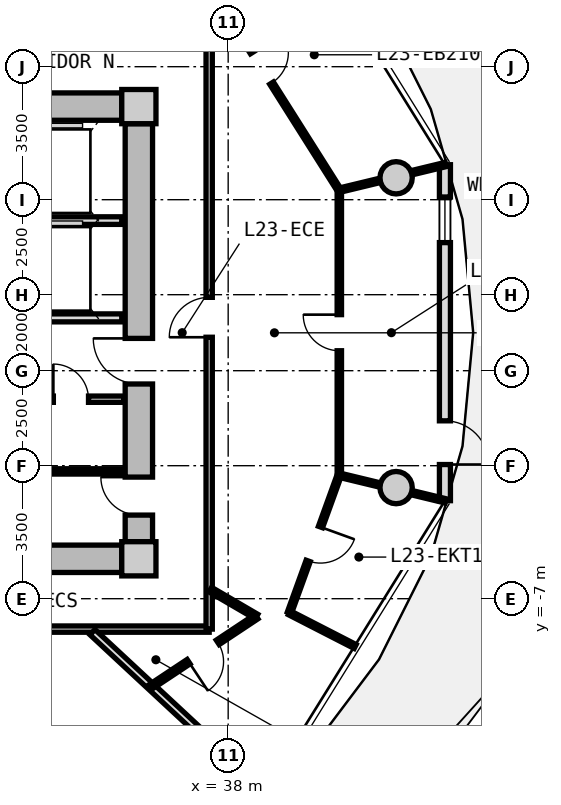
"""IFC4 building model, lengths in metres.
Left out: names, types, materials, properties, quantities, classifications, styles, units other than length and angle.
Written with IfcOpenShell. Run it as: python <this file> out.ifc"""

import sys

from ifc_helpers import new_model, si_unit, direction, frame, frame_2d, origin, origin_2d, place, context, subcontext, project, spatial, rectangle, circle, extrude, source, transform, mapped, element, fill, save


model = new_model("IFC4")
c1 = context("Model", 3, precision=1e-05, world=origin(), true_north=direction((0.0, 1.0)))
c2 = subcontext(c1, "Body", "Model", "MODEL_VIEW")
j1 = project(units=[si_unit("LENGTHUNIT", "METRE"), si_unit("PLANEANGLEUNIT", "RADIAN")], contexts=[c1])
p1 = place(None, origin())
s1 = spatial("IfcSite", under=j1, at=p1, CompositionType="ELEMENT")
p2 = place(p1, origin())
s2 = spatial("IfcBuilding", under=s1, at=p2, CompositionType="ELEMENT")
p3 = place(p2, frame((0.0, 0.0, 77.95)))
s3 = spatial("IfcBuildingStorey", under=s2, at=p3, CompositionType="ELEMENT", Elevation=77.95)
m1 = source(origin(), c2, "Body", "SweptSolid", [
    extrude(rectangle(XDim=0.9, YDim=0.9, at=origin_2d()), origin(), (0.0, 0.0, 1.0), 3.05),
])
for number, where, z_axis, x_axis in (
    (1, (35.65, -5.95, 0.0), (0.0, 0.0, 1.0), (1.0, 0.0, 0.0)),
    (2, (35.65, 5.95, 0.0), (0.0, 0.0, 1.0), (1.0, 0.0, 0.0)),
):
    element("IfcColumn", number, at=place(p3, frame(where, z_axis=z_axis, x_axis=x_axis)), inside=s3, PredefinedType="COLUMN", context=c2, shape_type="MappedRepresentation", body=[
        mapped(m1, transform((0.0, 0.0, 0.0), x_axis=(1.0, 0.0, 0.0), y_axis=(0.0, 1.0, 0.0), z_axis=(0.0, 0.0, 1.0), scale=1.0)),
    ])
m2 = source(origin(), c2, "Body", "SweptSolid", [
    extrude(rectangle(XDim=14.4, YDim=0.72, at=frame_2d((7.2, 0.0))), origin(), (0.0, 0.0, 1.0), 2.79),
])
for number, where, z_axis, x_axis in (
    (3, (20.8, 5.95, 0.0), (0.0, 0.0, 1.0), (1.0, 0.0, 0.0)),
    (4, (35.2, -5.95, 0.0), (0.0, 0.0, 1.0), (-1.0, 0.0, 0.0)),
):
    element("IfcWall", number, at=place(p3, frame(where, z_axis=z_axis, x_axis=x_axis)), inside=s3, PredefinedType="SHEAR", context=c2, shape_type="MappedRepresentation", body=[
        mapped(m2, transform((0.0, 0.0, 0.0), x_axis=(1.0, 0.0, 0.0), y_axis=(0.0, 1.0, 0.0), z_axis=(0.0, 0.0, 1.0), scale=1.0)),
    ])
m3 = source(origin(), c2, "Body", "SweptSolid", [
    extrude(rectangle(XDim=11.0, YDim=0.72, at=frame_2d((5.5, 0.0))), origin(), (0.0, 0.0, 1.0), 2.79),
])
p4 = place(p3, frame((35.65, 5.5, 0.0), z_axis=(0.0, 0.0, 1.0), x_axis=(0.0, -1.0, 0.0)))
e5 = element("IfcWall", 5, at=p4, inside=s3, PredefinedType="SHEAR", context=c2, shape_type="MappedRepresentation", body=[
    mapped(m3, transform((0.0, 0.0, 0.0), x_axis=(1.0, 0.0, 0.0), y_axis=(0.0, 1.0, 0.0), z_axis=(0.0, 0.0, 1.0), scale=1.0)),
])
p5 = place(p4, frame((5.65, 0.0, 0.0)))
e6 = element("IfcOpeningElement", 6, at=p5, cuts=e5, PredefinedType="OPENING", context=c2, shape_type="SweptSolid", body=[
    extrude(rectangle(XDim=1.2, YDim=2.15, at=frame_2d((0.6, 1.075))), frame((0.0, 0.37, 0.0), z_axis=(0.0, -1.0, 0.0), x_axis=(1.0, 0.0, 0.0)), (0.0, 0.0, 1.0), 0.74),
])
p6 = place(p4, frame((9.3, 0.0, 0.0)))
e7 = element("IfcOpeningElement", 7, at=p6, cuts=e5, PredefinedType="OPENING", context=c2, shape_type="SweptSolid", body=[
    extrude(rectangle(XDim=1.0, YDim=2.1, at=frame_2d((0.5, 1.05))), frame((0.0, 0.37, 0.0), z_axis=(0.0, -1.0, 0.0), x_axis=(1.0, 0.0, 0.0)), (0.0, 0.0, 1.0), 0.74),
])
m4 = source(origin(), c2, "Body", "SweptSolid", [
    extrude(circle(Radius=0.425, at=origin_2d()), origin(), (0.0, 0.0, 1.0), 3.47),
])
for number, where, z_axis, x_axis in (
    (8, (42.419, 4.076, -0.42), (0.0, 0.0, 1.0), (1.0, 0.0, 0.0)),
    (9, (42.419, -4.076, -0.42), (0.0, 0.0, 1.0), (1.0, 0.0, 0.0)),
):
    element("IfcColumn", number, at=place(p3, frame(where, z_axis=z_axis, x_axis=x_axis)), inside=s3, PredefinedType="COLUMN", context=c2, shape_type="MappedRepresentation", body=[
        mapped(m4, transform((0.0, 0.0, 0.0), x_axis=(1.0, 0.0, 0.0), y_axis=(0.0, 1.0, 0.0), z_axis=(0.0, 0.0, 1.0), scale=1.0)),
    ])
m5 = source(origin(), c2, "Body", "SweptSolid", [
    extrude(rectangle(XDim=8.841, YDim=0.29, at=frame_2d((4.421, 0.0))), origin(), (0.0, 0.0, 1.0), 2.79),
])
p7 = place(p3, frame((43.704, 4.421, 0.0), z_axis=(0.0, 0.0, 1.0), x_axis=(0.0, -1.0, 0.0)))
e10 = element("IfcWall", 10, at=p7, inside=s3, PredefinedType="SOLIDWALL", context=c2, shape_type="MappedRepresentation", body=[
    mapped(m5, transform((0.0, 0.0, 0.0), x_axis=(1.0, 0.0, 0.0), y_axis=(0.0, 1.0, 0.0), z_axis=(0.0, 0.0, 1.0), scale=1.0)),
])
p8 = place(p7, frame((6.74, 0.0, 0.0)))
e11 = element("IfcOpeningElement", 11, at=p8, cuts=e10, PredefinedType="OPENING", context=c2, shape_type="SweptSolid", body=[
    extrude(rectangle(XDim=1.15, YDim=2.25, at=frame_2d((0.575, 1.125))), frame((0.0, 0.155, 0.0), z_axis=(0.0, -1.0, 0.0), x_axis=(1.0, 0.0, 0.0)), (0.0, 0.0, 1.0), 0.31),
])
p9 = place(p7, frame((0.85, 0.0, 0.85)))
e12 = element("IfcOpeningElement", 12, at=p9, cuts=e10, PredefinedType="OPENING", context=c2, shape_type="SweptSolid", body=[
    extrude(rectangle(XDim=1.2, YDim=1.5, at=frame_2d((0.6, 0.75))), frame((0.0, 0.155, 0.0), z_axis=(0.0, -1.0, 0.0), x_axis=(1.0, 0.0, 0.0)), (0.0, 0.0, 1.0), 0.31),
])
m6 = source(origin(), c2, "Body", "SweptSolid", [
    extrude(rectangle(XDim=3.2, YDim=0.2, at=frame_2d((1.6, 0.0))), origin(), (0.0, 0.0, 1.0), 2.775),
])
p10 = place(p3, frame((32.0, 2.95, 0.0), z_axis=(0.0, 0.0, 1.0), x_axis=(1.0, 0.0, 0.0)))
e13 = element("IfcWall", 13, at=p10, inside=s3, PredefinedType="PARTITIONING", context=c2, shape_type="MappedRepresentation", body=[
    mapped(m6, transform((0.0, 0.0, 0.0), x_axis=(1.0, 0.0, 0.0), y_axis=(0.0, 1.0, 0.0), z_axis=(0.0, 0.0, 1.0), scale=1.0)),
])
m7 = source(origin(), c2, "Body", "SweptSolid", [
    extrude(rectangle(XDim=6.66, YDim=0.21, at=frame_2d((3.33, 0.0))), origin(), (0.0, 0.0, 1.0), 2.775),
])
p11 = place(p3, frame((28.54, 0.39, 0.0), z_axis=(0.0, 0.0, 1.0), x_axis=(1.0, 0.0, 0.0)))
e14 = element("IfcWall", 14, at=p11, inside=s3, PredefinedType="PARTITIONING", context=c2, shape_type="MappedRepresentation", body=[
    mapped(m7, transform((0.0, 0.0, 0.0), x_axis=(1.0, 0.0, 0.0), y_axis=(0.0, 1.0, 0.0), z_axis=(0.0, 0.0, 1.0), scale=1.0)),
])
p12 = place(p11, frame((1.0, 0.0, 0.0)))
e15 = element("IfcOpeningElement", 15, at=p12, cuts=e14, PredefinedType="OPENING", context=c2, shape_type="SweptSolid", body=[
    extrude(rectangle(XDim=1.2, YDim=2.15, at=frame_2d((0.6, 1.075))), frame((0.0, 0.115, 0.0), z_axis=(0.0, -1.0, 0.0), x_axis=(1.0, 0.0, 0.0)), (0.0, 0.0, 1.0), 0.23),
])
m8 = source(origin(), c2, "Body", "SweptSolid", [
    extrude(rectangle(XDim=2.7, YDim=0.165, at=frame_2d((1.35, 0.0))), origin(), (0.0, 0.0, 1.0), 2.775),
])
p13 = place(p3, frame((32.55, -1.75, 0.0), z_axis=(0.0, 0.0, 1.0), x_axis=(1.0, 0.0, 0.0)))
e16 = element("IfcWall", 16, at=p13, inside=s3, PredefinedType="PARTITIONING", context=c2, shape_type="MappedRepresentation", body=[
    mapped(m8, transform((0.0, 0.0, 0.0), x_axis=(1.0, 0.0, 0.0), y_axis=(0.0, 1.0, 0.0), z_axis=(0.0, 0.0, 1.0), scale=1.0)),
])
p14 = place(p13, frame((0.85, 0.0, 0.0)))
e17 = element("IfcOpeningElement", 17, at=p14, cuts=e16, PredefinedType="OPENING", context=c2, shape_type="SweptSolid", body=[
    extrude(rectangle(XDim=0.925, YDim=2.1, at=frame_2d((0.462, 1.05))), frame((0.0, 0.093, 0.0), z_axis=(0.0, -1.0, 0.0), x_axis=(1.0, 0.0, 0.0)), (0.0, 0.0, 1.0), 0.185),
])
m9 = source(origin(), c2, "Body", "SweptSolid", [
    extrude(rectangle(XDim=2.7, YDim=0.14, at=frame_2d((1.35, 0.0))), origin(), (0.0, 0.0, 1.0), 2.775),
])
p15 = place(p3, frame((32.55, -3.65, 0.0), z_axis=(0.0, 0.0, 1.0), x_axis=(1.0, 0.0, 0.0)))
e18 = element("IfcWall", 18, at=p15, inside=s3, PredefinedType="PARTITIONING", context=c2, shape_type="MappedRepresentation", body=[
    mapped(m9, transform((0.0, 0.0, 0.0), x_axis=(1.0, 0.0, 0.0), y_axis=(0.0, 1.0, 0.0), z_axis=(0.0, 0.0, 1.0), scale=1.0)),
])
m10 = source(origin(), c2, "Body", "SweptSolid", [
    extrude(rectangle(XDim=19.0, YDim=0.165, at=frame_2d((9.5, 0.0))), origin(), (0.0, 0.0, 1.0), 2.775),
])
p16 = place(p3, frame((37.5, -7.8, 0.0), z_axis=(0.0, 0.0, 1.0), x_axis=(-1.0, 0.0, 0.0)))
e19 = element("IfcWall", 19, at=p16, inside=s3, PredefinedType="PARTITIONING", context=c2, shape_type="MappedRepresentation", body=[
    mapped(m10, transform((0.0, 0.0, 0.0), x_axis=(1.0, 0.0, 0.0), y_axis=(0.0, 1.0, 0.0), z_axis=(0.0, 0.0, 1.0), scale=1.0)),
])
p17 = place(p16, frame((9.388, 0.0, 0.0)))
e20 = element("IfcOpeningElement", 20, at=p17, cuts=e19, PredefinedType="OPENING", context=c2, shape_type="SweptSolid", body=[
    extrude(rectangle(XDim=1.05, YDim=2.15, at=frame_2d((0.525, 1.075))), frame((0.0, 0.093, 0.0), z_axis=(0.0, -1.0, 0.0), x_axis=(1.0, 0.0, 0.0)), (0.0, 0.0, 1.0), 0.185),
])
m11 = source(origin(), c2, "Body", "SweptSolid", [
    extrude(rectangle(XDim=15.6, YDim=0.165, at=frame_2d((7.8, 0.0))), origin(), (0.0, 0.0, 1.0), 2.775),
])
p18 = place(p3, frame((37.5, 7.8, 0.0), z_axis=(0.0, 0.0, 1.0), x_axis=(0.0, -1.0, 0.0)))
e21 = element("IfcWall", 21, at=p18, inside=s3, PredefinedType="PARTITIONING", context=c2, shape_type="MappedRepresentation", body=[
    mapped(m11, transform((0.0, 0.0, 0.0), x_axis=(1.0, 0.0, 0.0), y_axis=(0.0, 1.0, 0.0), z_axis=(0.0, 0.0, 1.0), scale=1.0)),
])
p19 = place(p18, frame((6.87, 0.0, 0.0)))
e22 = element("IfcOpeningElement", 22, at=p19, cuts=e21, PredefinedType="OPENING", context=c2, shape_type="SweptSolid", body=[
    extrude(rectangle(XDim=1.05, YDim=2.15, at=frame_2d((0.525, 1.075))), frame((0.0, 0.093, 0.0), z_axis=(0.0, -1.0, 0.0), x_axis=(1.0, 0.0, 0.0)), (0.0, 0.0, 1.0), 0.185),
])
m12 = source(origin(), c2, "Body", "SweptSolid", [
    extrude(rectangle(XDim=6.187, YDim=0.19, at=frame_2d((3.093, 0.0))), origin(), (0.0, 0.0, 1.0), 2.275),
])
p20 = place(p3, frame((34.429, -7.88, 0.0), z_axis=(0.0, 0.0, 1.0), x_axis=(0.732501077882, -0.680765870841, 0.0)))
e23 = element("IfcWall", 23, at=p20, inside=s3, PredefinedType="PARTITIONING", context=c2, shape_type="MappedRepresentation", body=[
    mapped(m12, transform((0.0, 0.0, 0.0), x_axis=(1.0, 0.0, 0.0), y_axis=(0.0, 1.0, 0.0), z_axis=(0.0, 0.0, 1.0), scale=1.0)),
])
m13 = source(origin(), c2, "Body", "SweptSolid", [
    extrude(rectangle(XDim=7.499, YDim=0.115, at=frame_2d((3.75, 0.0))), origin(), (0.0, 0.0, 1.0), 2.775),
])
p21 = place(p3, frame((40.925, -3.75, 0.0), z_axis=(0.0, 0.0, 1.0), x_axis=(0.0, 1.0, 0.0)))
e24 = element("IfcWall", 24, at=p21, inside=s3, PredefinedType="PARTITIONING", context=c2, shape_type="MappedRepresentation", body=[
    mapped(m13, transform((0.0, 0.0, 0.0), x_axis=(1.0, 0.0, 0.0), y_axis=(0.0, 1.0, 0.0), z_axis=(0.0, 0.0, 1.0), scale=1.0)),
])
p22 = place(p21, frame((3.275, 0.0, 0.0)))
e25 = element("IfcOpeningElement", 25, at=p22, cuts=e24, PredefinedType="OPENING", context=c2, shape_type="SweptSolid", body=[
    extrude(rectangle(XDim=0.95, YDim=2.1, at=frame_2d((0.475, 1.05))), frame((0.0, 0.067, 0.0), z_axis=(0.0, -1.0, 0.0), x_axis=(1.0, 0.0, 0.0)), (0.0, 0.0, 1.0), 0.135),
])
m14 = source(origin(), c2, "Body", "SweptSolid", [
    extrude(rectangle(XDim=2.879, YDim=0.115, at=frame_2d((1.439, 0.0))), origin(), (0.0, 0.0, 1.0), 2.275),
])
p23 = place(p3, frame((40.925, -3.75, 0.0), z_axis=(0.0, 0.0, 1.0), x_axis=(0.972018140943, -0.234905797454, 0.0)))
e26 = element("IfcWall", 26, at=p23, inside=s3, PredefinedType="PARTITIONING", context=c2, shape_type="MappedRepresentation", body=[
    mapped(m14, transform((0.0, 0.0, 0.0), x_axis=(1.0, 0.0, 0.0), y_axis=(0.0, 1.0, 0.0), z_axis=(0.0, 0.0, 1.0), scale=1.0)),
])
m15 = source(origin(), c2, "Body", "SweptSolid", [
    extrude(rectangle(XDim=7.618, YDim=0.115, at=frame_2d((3.809, 0.0))), origin(), (0.0, 0.0, 1.0), 2.775),
])
p24 = place(p3, frame((40.923, 3.749, 0.0), z_axis=(0.0, 0.0, 1.0), x_axis=(-0.534316104929, 0.845284744931, 0.0)))
e27 = element("IfcWall", 27, at=p24, inside=s3, PredefinedType="PARTITIONING", context=c2, shape_type="MappedRepresentation", body=[
    mapped(m15, transform((0.0, 0.0, 0.0), x_axis=(1.0, 0.0, 0.0), y_axis=(0.0, 1.0, 0.0), z_axis=(0.0, 0.0, 1.0), scale=1.0)),
])
p25 = place(p24, frame((3.334, 0.0, 0.0)))
e28 = element("IfcOpeningElement", 28, at=p25, cuts=e27, PredefinedType="OPENING", context=c2, shape_type="SweptSolid", body=[
    extrude(rectangle(XDim=0.95, YDim=2.1, at=frame_2d((0.475, 1.05))), frame((0.0, 0.067, 0.0), z_axis=(0.0, -1.0, 0.0), x_axis=(1.0, 0.0, 0.0)), (0.0, 0.0, 1.0), 0.135),
])
m16 = source(origin(), c2, "Body", "SweptSolid", [
    extrude(rectangle(XDim=2.881, YDim=0.115, at=frame_2d((1.44, 0.0))), origin(), (0.0, 0.0, 1.0), 2.275),
])
p26 = place(p3, frame((40.923, 3.749, 0.0), z_axis=(0.0, 0.0, 1.0), x_axis=(0.972031524605, 0.234850410208, 0.0)))
e29 = element("IfcWall", 29, at=p26, inside=s3, PredefinedType="PARTITIONING", context=c2, shape_type="MappedRepresentation", body=[
    mapped(m16, transform((0.0, 0.0, 0.0), x_axis=(1.0, 0.0, 0.0), y_axis=(0.0, 1.0, 0.0), z_axis=(0.0, 0.0, 1.0), scale=1.0)),
])
m17 = source(origin(), c2, "Body", "SweptSolid", [
    extrude(rectangle(XDim=1.407, YDim=0.14, at=frame_2d((0.704, 0.0))), origin(), (0.0, 0.0, 1.0), 2.775),
])
p27 = place(p3, frame((37.53, -6.762, 0.0), z_axis=(0.0, 0.0, 1.0), x_axis=(0.863539718977, -0.504280828258, 0.0)))
e30 = element("IfcWall", 30, at=p27, inside=s3, PredefinedType="PARTITIONING", context=c2, shape_type="MappedRepresentation", body=[
    mapped(m17, transform((0.0, 0.0, 0.0), x_axis=(1.0, 0.0, 0.0), y_axis=(0.0, 1.0, 0.0), z_axis=(0.0, 0.0, 1.0), scale=1.0)),
])
m18 = source(origin(), c2, "Body", "SweptSolid", [
    extrude(rectangle(XDim=3.368, YDim=0.14, at=frame_2d((1.684, 0.0))), origin(), (0.0, 0.0, 1.0), 2.775),
])
p28 = place(p3, frame((38.745, -7.472, 0.0), z_axis=(0.0, 0.0, 1.0), x_axis=(-0.83321925645, -0.552942737253, 0.0)))
e31 = element("IfcWall", 31, at=p28, inside=s3, PredefinedType="PARTITIONING", context=c2, shape_type="MappedRepresentation", body=[
    mapped(m18, transform((0.0, 0.0, 0.0), x_axis=(1.0, 0.0, 0.0), y_axis=(0.0, 1.0, 0.0), z_axis=(0.0, 0.0, 1.0), scale=1.0)),
])
p29 = place(p28, frame((1.224, 0.0, 0.0)))
e32 = element("IfcOpeningElement", 32, at=p29, cuts=e31, PredefinedType="OPENING", context=c2, shape_type="SweptSolid", body=[
    extrude(rectangle(XDim=0.92, YDim=2.1, at=frame_2d((0.46, 1.05))), frame((0.0, 0.08, 0.0), z_axis=(0.0, -1.0, 0.0), x_axis=(1.0, 0.0, 0.0)), (0.0, 0.0, 1.0), 0.16),
])
m19 = source(origin(), c2, "Body", "SweptSolid", [
    extrude(rectangle(XDim=1.945, YDim=0.115, at=frame_2d((0.973, 0.0))), origin(), (0.0, 0.0, 1.0), 2.775),
])
p30 = place(p3, frame((39.611, -7.37, 0.0), z_axis=(0.0, 0.0, 1.0), x_axis=(0.889684148329, -0.456576517368, 0.0)))
e33 = element("IfcWall", 33, at=p30, inside=s3, PredefinedType="PARTITIONING", context=c2, shape_type="MappedRepresentation", body=[
    mapped(m19, transform((0.0, 0.0, 0.0), x_axis=(1.0, 0.0, 0.0), y_axis=(0.0, 1.0, 0.0), z_axis=(0.0, 0.0, 1.0), scale=1.0)),
])
m20 = source(origin(), c2, "Body", "SweptSolid", [
    extrude(rectangle(XDim=3.852, YDim=0.115, at=frame_2d((1.926, 0.0))), origin(), (0.0, 0.0, 1.0), 2.775),
])
p31 = place(p3, frame((39.611, -7.37, 0.0), z_axis=(0.0, 0.0, 1.0), x_axis=(0.340653649518, 0.940188859257, 0.0)))
e34 = element("IfcWall", 34, at=p31, inside=s3, PredefinedType="PARTITIONING", context=c2, shape_type="MappedRepresentation", body=[
    mapped(m20, transform((0.0, 0.0, 0.0), x_axis=(1.0, 0.0, 0.0), y_axis=(0.0, 1.0, 0.0), z_axis=(0.0, 0.0, 1.0), scale=1.0)),
])
p32 = place(p31, frame((1.451, 0.0, 0.0)))
e35 = element("IfcOpeningElement", 35, at=p32, cuts=e34, PredefinedType="OPENING", context=c2, shape_type="SweptSolid", body=[
    extrude(rectangle(XDim=0.95, YDim=2.1, at=frame_2d((0.475, 1.05))), frame((0.0, 0.067, 0.0), z_axis=(0.0, -1.0, 0.0), x_axis=(1.0, 0.0, 0.0)), (0.0, 0.0, 1.0), 0.135),
])
m21 = source(origin(), c2, "Body", "SweptSolid", [
    extrude(rectangle(XDim=1.15, YDim=2.25, at=frame_2d((0.575, 1.125))), frame((0.0, 0.025, 0.0), z_axis=(0.0, -1.0, 0.0), x_axis=(1.0, 0.0, 0.0)), (0.0, 0.0, 1.0), 0.05),
])
p33 = place(p8, origin())
e36 = element("IfcDoor", 36, at=p33, inside=s3, OperationType="SINGLE_SWING_RIGHT", PredefinedType="DOOR", context=c2, shape_type="MappedRepresentation", body=[
    mapped(m21, transform((0.0, 0.0, 0.0), x_axis=(1.0, 0.0, 0.0), y_axis=(0.0, 1.0, 0.0), z_axis=(0.0, 0.0, 1.0), scale=1.0)),
])
fill(e11, e36)
m22 = source(origin(), c2, "Body", "SweptSolid", [
    extrude(rectangle(XDim=1.2, YDim=1.5, at=frame_2d((0.6, 0.75))), frame((0.0, 0.03, 0.0), z_axis=(0.0, -1.0, 0.0), x_axis=(1.0, 0.0, 0.0)), (0.0, 0.0, 1.0), 0.06),
])
p34 = place(p9, origin())
e37 = element("IfcWindow", 37, at=p34, inside=s3, PartitioningType="SINGLE_PANEL", PredefinedType="WINDOW", context=c2, shape_type="MappedRepresentation", body=[
    mapped(m22, transform((0.0, 0.0, 0.0), x_axis=(1.0, 0.0, 0.0), y_axis=(0.0, 1.0, 0.0), z_axis=(0.0, 0.0, 1.0), scale=1.0)),
])
fill(e12, e37)
m23 = source(origin(), c2, "Body", "SweptSolid", [
    extrude(rectangle(XDim=1.2, YDim=2.15, at=frame_2d((0.6, 1.075))), frame((0.0, 0.025, 0.0), z_axis=(0.0, -1.0, 0.0), x_axis=(1.0, 0.0, 0.0)), (0.0, 0.0, 1.0), 0.05),
])
p35 = place(p5, frame((1.2, 0.0, 0.0), z_axis=(0.0, 0.0, 1.0), x_axis=(-1.0, 0.0, 0.0)))
e38 = element("IfcDoor", 38, at=p35, inside=s3, OperationType="SINGLE_SWING_RIGHT", PredefinedType="DOOR", context=c2, shape_type="MappedRepresentation", body=[
    mapped(m23, transform((0.0, 0.0, 0.0), x_axis=(1.0, 0.0, 0.0), y_axis=(0.0, 1.0, 0.0), z_axis=(0.0, 0.0, 1.0), scale=1.0)),
])
fill(e6, e38)
m24 = source(origin(), c2, "Body", "SweptSolid", [
    extrude(rectangle(XDim=0.925, YDim=2.1, at=frame_2d((0.462, 1.05))), frame((0.0, 0.025, 0.0), z_axis=(0.0, -1.0, 0.0), x_axis=(1.0, 0.0, 0.0)), (0.0, 0.0, 1.0), 0.05),
])
p36 = place(p14, origin())
e39 = element("IfcDoor", 39, at=p36, inside=s3, OperationType="SINGLE_SWING_LEFT", PredefinedType="DOOR", context=c2, shape_type="MappedRepresentation", body=[
    mapped(m24, transform((0.0, 0.0, 0.0), x_axis=(1.0, 0.0, 0.0), y_axis=(0.0, 1.0, 0.0), z_axis=(0.0, 0.0, 1.0), scale=1.0)),
])
fill(e17, e39)
m25 = source(origin(), c2, "Body", "SweptSolid", [
    extrude(rectangle(XDim=1.0, YDim=2.1, at=frame_2d((0.5, 1.05))), frame((0.0, 0.025, 0.0), z_axis=(0.0, -1.0, 0.0), x_axis=(1.0, 0.0, 0.0)), (0.0, 0.0, 1.0), 0.05),
])
p37 = place(p6, frame((1.0, 0.0, 0.0), z_axis=(0.0, 0.0, 1.0), x_axis=(-1.0, 0.0, 0.0)))
e40 = element("IfcDoor", 40, at=p37, inside=s3, OperationType="SINGLE_SWING_RIGHT", PredefinedType="DOOR", context=c2, shape_type="MappedRepresentation", body=[
    mapped(m25, transform((0.0, 0.0, 0.0), x_axis=(1.0, 0.0, 0.0), y_axis=(0.0, 1.0, 0.0), z_axis=(0.0, 0.0, 1.0), scale=1.0)),
])
fill(e7, e40)
m26 = source(origin(), c2, "Body", "SweptSolid", [
    extrude(rectangle(XDim=1.05, YDim=2.15, at=frame_2d((0.525, 1.075))), frame((0.0, 0.025, 0.0), z_axis=(0.0, -1.0, 0.0), x_axis=(1.0, 0.0, 0.0)), (0.0, 0.0, 1.0), 0.05),
])
p38 = place(p19, frame((1.05, 0.0, 0.0), z_axis=(0.0, 0.0, 1.0), x_axis=(-1.0, 0.0, 0.0)))
e41 = element("IfcDoor", 41, at=p38, inside=s3, OperationType="SINGLE_SWING_LEFT", PredefinedType="DOOR", context=c2, shape_type="MappedRepresentation", body=[
    mapped(m26, transform((0.0, 0.0, 0.0), x_axis=(1.0, 0.0, 0.0), y_axis=(0.0, 1.0, 0.0), z_axis=(0.0, 0.0, 1.0), scale=1.0)),
])
fill(e22, e41)
m27 = source(origin(), c2, "Body", "SweptSolid", [
    extrude(rectangle(XDim=0.92, YDim=2.1, at=frame_2d((0.46, 1.05))), frame((0.0, 0.025, 0.0), z_axis=(0.0, -1.0, 0.0), x_axis=(1.0, 0.0, 0.0)), (0.0, 0.0, 1.0), 0.05),
])
p39 = place(p29, origin())
e42 = element("IfcDoor", 42, at=p39, inside=s3, OperationType="SINGLE_SWING_RIGHT", PredefinedType="DOOR", context=c2, shape_type="MappedRepresentation", body=[
    mapped(m27, transform((0.0, 0.0, 0.0), x_axis=(1.0, 0.0, 0.0), y_axis=(0.0, 1.0, 0.0), z_axis=(0.0, 0.0, 1.0), scale=1.0)),
])
fill(e32, e42)
m28 = source(origin(), c2, "Body", "SweptSolid", [
    extrude(rectangle(XDim=0.95, YDim=2.1, at=frame_2d((0.475, 1.05))), frame((0.0, 0.025, 0.0), z_axis=(0.0, -1.0, 0.0), x_axis=(1.0, 0.0, 0.0)), (0.0, 0.0, 1.0), 0.05),
])
p40 = place(p32, frame((0.95, 0.0, 0.0), z_axis=(0.0, 0.0, 1.0), x_axis=(-1.0, 0.0, 0.0)))
e43 = element("IfcDoor", 43, at=p40, inside=s3, OperationType="SINGLE_SWING_LEFT", PredefinedType="DOOR", context=c2, shape_type="MappedRepresentation", body=[
    mapped(m28, transform((0.0, 0.0, 0.0), x_axis=(1.0, 0.0, 0.0), y_axis=(0.0, 1.0, 0.0), z_axis=(0.0, 0.0, 1.0), scale=1.0)),
])
fill(e35, e43)
p41 = place(p22, origin())
e44 = element("IfcDoor", 44, at=p41, inside=s3, OperationType="SINGLE_SWING_RIGHT", PredefinedType="DOOR", context=c2, shape_type="MappedRepresentation", body=[
    mapped(m28, transform((0.0, 0.0, 0.0), x_axis=(1.0, 0.0, 0.0), y_axis=(0.0, 1.0, 0.0), z_axis=(0.0, 0.0, 1.0), scale=1.0)),
])
fill(e25, e44)
p42 = place(p25, frame((0.95, 0.0, 0.0), z_axis=(0.0, 0.0, 1.0), x_axis=(-1.0, 0.0, 0.0)))
e45 = element("IfcDoor", 45, at=p42, inside=s3, OperationType="SINGLE_SWING_LEFT", PredefinedType="DOOR", context=c2, shape_type="MappedRepresentation", body=[
    mapped(m28, transform((0.0, 0.0, 0.0), x_axis=(1.0, 0.0, 0.0), y_axis=(0.0, 1.0, 0.0), z_axis=(0.0, 0.0, 1.0), scale=1.0)),
])
fill(e28, e45)
save(model, sys.argv[1])
